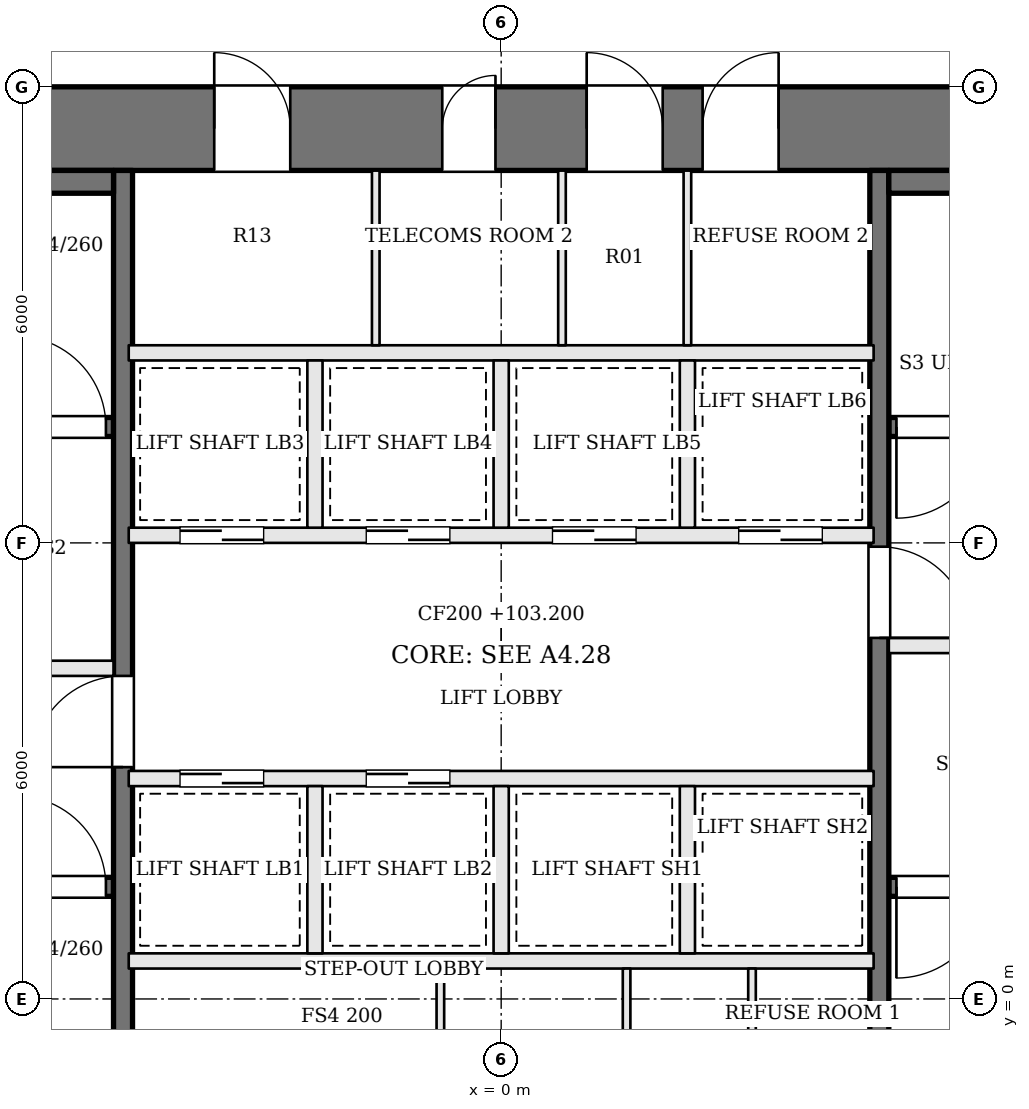
"""IFC4 building model, lengths in metres.
Left out: names, types, materials, properties, quantities, classifications, styles, units other than length and angle.
Written with IfcOpenShell. Run it as: python <this file> out.ifc"""

import sys

from ifc_helpers import new_model, si_unit, direction, frame, frame_2d, origin, place, context, subcontext, project, spatial, rectangle, extrude, element, fill, save


model = new_model("IFC4")
c1 = context("Model", 3, precision=1e-05, world=origin(), true_north=direction((0.0, 1.0)))
c2 = subcontext(c1, "Body", "Model", "MODEL_VIEW")
j1 = project(units=[si_unit("LENGTHUNIT", "METRE"), si_unit("PLANEANGLEUNIT", "RADIAN")], contexts=[c1])
p1 = place(None, origin())
s1 = spatial("IfcSite", under=j1, at=p1, CompositionType="ELEMENT")
p2 = place(p1, origin())
s2 = spatial("IfcBuilding", under=s1, at=p2, CompositionType="ELEMENT")
p3 = place(p2, frame((0.0, 0.0, 103.2)))
s3 = spatial("IfcBuildingStorey", under=s2, at=p3, CompositionType="ELEMENT", Elevation=103.2)
p4 = place(p3, frame((-13.0, 11.45, 0.0), z_axis=(0.0, 0.0, 1.0), x_axis=(1.0, 0.0, 0.0)))
e1 = element("IfcWall", 1, at=p4, inside=s3, PredefinedType="SHEAR", context=c2, shape_type="SweptSolid", body=[
    extrude(rectangle(XDim=26.0, YDim=1.1, at=frame_2d((13.0, 0.0))), origin(), (0.0, 0.0, 1.0), 3.6),
])
p5 = place(p4, frame((9.225, 0.0, 0.0)))
e2 = element("IfcOpeningElement", 2, at=p5, cuts=e1, PredefinedType="OPENING", context=c2, shape_type="SweptSolid", body=[
    extrude(rectangle(XDim=1.0, YDim=2.1, at=frame_2d((0.5, 1.05))), frame((0.0, 0.56, 0.0), z_axis=(0.0, -1.0, 0.0), x_axis=(1.0, 0.0, 0.0)), (0.0, 0.0, 1.0), 1.12),
])
p6 = place(p4, frame((12.225, 0.0, 0.0)))
e3 = element("IfcOpeningElement", 3, at=p6, cuts=e1, PredefinedType="OPENING", context=c2, shape_type="SweptSolid", body=[
    extrude(rectangle(XDim=0.7, YDim=2.1, at=frame_2d((0.35, 1.05))), frame((0.0, 0.56, 0.0), z_axis=(0.0, -1.0, 0.0), x_axis=(1.0, 0.0, 0.0)), (0.0, 0.0, 1.0), 1.12),
])
p7 = place(p4, frame((14.125, 0.0, 0.0)))
e4 = element("IfcOpeningElement", 4, at=p7, cuts=e1, PredefinedType="OPENING", context=c2, shape_type="SweptSolid", body=[
    extrude(rectangle(XDim=1.0, YDim=2.1, at=frame_2d((0.5, 1.05))), frame((0.0, 0.56, 0.0), z_axis=(0.0, -1.0, 0.0), x_axis=(1.0, 0.0, 0.0)), (0.0, 0.0, 1.0), 1.12),
])
p8 = place(p4, frame((15.65, 0.0, 0.0)))
e5 = element("IfcOpeningElement", 5, at=p8, cuts=e1, PredefinedType="OPENING", context=c2, shape_type="SweptSolid", body=[
    extrude(rectangle(XDim=1.0, YDim=2.1, at=frame_2d((0.5, 1.05))), frame((0.0, 0.56, 0.0), z_axis=(0.0, -1.0, 0.0), x_axis=(1.0, 0.0, 0.0)), (0.0, 0.0, 1.0), 1.12),
])
p9 = place(p3, frame((-11.9, 1.475, 0.0), z_axis=(0.0, 0.0, 1.0), x_axis=(1.0, 0.0, 0.0)))
e6 = element("IfcWall", 6, at=p9, inside=s3, PredefinedType="SOLIDWALL", context=c2, shape_type="SweptSolid", body=[
    extrude(rectangle(XDim=6.8, YDim=0.25, at=frame_2d((3.4, 0.0))), origin(), (0.0, 0.0, 1.0), 3.4),
])
p10 = place(p9, frame((5.5, 0.0, 0.0)))
e7 = element("IfcOpeningElement", 7, at=p10, cuts=e6, PredefinedType="OPENING", context=c2, shape_type="SweptSolid", body=[
    extrude(rectangle(XDim=1.2, YDim=2.1, at=frame_2d((0.6, 1.05))), frame((0.0, 0.135, 0.0), z_axis=(0.0, -1.0, 0.0), x_axis=(1.0, 0.0, 0.0)), (0.0, 0.0, 1.0), 0.27),
])
p11 = place(p3, frame((11.9, 7.525, 0.0), z_axis=(0.0, 0.0, 1.0), x_axis=(-1.0, 0.0, 0.0)))
e8 = element("IfcWall", 8, at=p11, inside=s3, PredefinedType="SOLIDWALL", context=c2, shape_type="SweptSolid", body=[
    extrude(rectangle(XDim=6.8, YDim=0.25, at=frame_2d((3.4, 0.0))), origin(), (0.0, 0.0, 1.0), 3.4),
])
p12 = place(p11, frame((5.5, 0.0, 0.0)))
e9 = element("IfcOpeningElement", 9, at=p12, cuts=e8, PredefinedType="OPENING", context=c2, shape_type="SweptSolid", body=[
    extrude(rectangle(XDim=1.2, YDim=2.1, at=frame_2d((0.6, 1.05))), frame((0.0, 0.135, 0.0), z_axis=(0.0, -1.0, 0.0), x_axis=(1.0, 0.0, 0.0)), (0.0, 0.0, 1.0), 0.27),
])
p13 = place(p3, frame((-11.9, 4.35, 0.0), z_axis=(0.0, 0.0, 1.0), x_axis=(1.0, 0.0, 0.0)))
e10 = element("IfcWall", 10, at=p13, inside=s3, PredefinedType="SOLIDWALL", context=c2, shape_type="SweptSolid", body=[
    extrude(rectangle(XDim=6.8, YDim=0.2, at=frame_2d((3.4, 0.0))), origin(), (0.0, 0.0, 1.0), 3.4),
])
p14 = place(p13, frame((4.1, 0.0, 0.0)))
e11 = element("IfcOpeningElement", 11, at=p14, cuts=e10, PredefinedType="OPENING", context=c2, shape_type="SweptSolid", body=[
    extrude(rectangle(XDim=1.2, YDim=2.1, at=frame_2d((0.6, 1.05))), frame((0.0, 0.11, 0.0), z_axis=(0.0, -1.0, 0.0), x_axis=(1.0, 0.0, 0.0)), (0.0, 0.0, 1.0), 0.22),
])
p15 = place(p13, frame((0.8, 0.0, 0.0)))
e12 = element("IfcOpeningElement", 12, at=p15, cuts=e10, PredefinedType="OPENING", context=c2, shape_type="SweptSolid", body=[
    extrude(rectangle(XDim=1.2, YDim=2.1, at=frame_2d((0.6, 1.05))), frame((0.0, 0.11, 0.0), z_axis=(0.0, -1.0, 0.0), x_axis=(1.0, 0.0, 0.0)), (0.0, 0.0, 1.0), 0.22),
])
p16 = place(p3, frame((11.9, 4.65, 0.0), z_axis=(0.0, 0.0, 1.0), x_axis=(-1.0, 0.0, 0.0)))
e13 = element("IfcWall", 13, at=p16, inside=s3, PredefinedType="SOLIDWALL", context=c2, shape_type="SweptSolid", body=[
    extrude(rectangle(XDim=6.8, YDim=0.2, at=frame_2d((3.4, 0.0))), origin(), (0.0, 0.0, 1.0), 3.4),
])
p17 = place(p16, frame((4.1, 0.0, 0.0)))
e14 = element("IfcOpeningElement", 14, at=p17, cuts=e13, PredefinedType="OPENING", context=c2, shape_type="SweptSolid", body=[
    extrude(rectangle(XDim=1.2, YDim=2.1, at=frame_2d((0.6, 1.05))), frame((0.0, 0.11, 0.0), z_axis=(0.0, -1.0, 0.0), x_axis=(1.0, 0.0, 0.0)), (0.0, 0.0, 1.0), 0.22),
])
p18 = place(p16, frame((0.8, 0.0, 0.0)))
e15 = element("IfcOpeningElement", 15, at=p18, cuts=e13, PredefinedType="OPENING", context=c2, shape_type="SweptSolid", body=[
    extrude(rectangle(XDim=1.2, YDim=2.1, at=frame_2d((0.6, 1.05))), frame((0.0, 0.11, 0.0), z_axis=(0.0, -1.0, 0.0), x_axis=(1.0, 0.0, 0.0)), (0.0, 0.0, 1.0), 0.22),
])
p19 = place(p3, frame((-11.9, 7.525, 0.0), z_axis=(0.0, 0.0, 1.0), x_axis=(1.0, 0.0, 0.0)))
e16 = element("IfcWall", 16, at=p19, inside=s3, PredefinedType="SOLIDWALL", context=c2, shape_type="SweptSolid", body=[
    extrude(rectangle(XDim=6.8, YDim=0.25, at=frame_2d((3.4, 0.0))), origin(), (0.0, 0.0, 1.0), 3.4),
])
p20 = place(p19, frame((5.5, 0.0, 0.0)))
e17 = element("IfcOpeningElement", 17, at=p20, cuts=e16, PredefinedType="OPENING", context=c2, shape_type="SweptSolid", body=[
    extrude(rectangle(XDim=1.2, YDim=2.1, at=frame_2d((0.6, 1.05))), frame((0.0, 0.135, 0.0), z_axis=(0.0, -1.0, 0.0), x_axis=(1.0, 0.0, 0.0)), (0.0, 0.0, 1.0), 0.27),
])
p21 = place(p3, frame((11.9, 1.475, 0.0), z_axis=(0.0, 0.0, 1.0), x_axis=(-1.0, 0.0, 0.0)))
e18 = element("IfcWall", 18, at=p21, inside=s3, PredefinedType="SOLIDWALL", context=c2, shape_type="SweptSolid", body=[
    extrude(rectangle(XDim=6.8, YDim=0.25, at=frame_2d((3.4, 0.0))), origin(), (0.0, 0.0, 1.0), 3.4),
])
p22 = place(p21, frame((5.5, 0.0, 0.0)))
e19 = element("IfcOpeningElement", 19, at=p22, cuts=e18, PredefinedType="OPENING", context=c2, shape_type="SweptSolid", body=[
    extrude(rectangle(XDim=1.2, YDim=2.1, at=frame_2d((0.6, 1.05))), frame((0.0, 0.135, 0.0), z_axis=(0.0, -1.0, 0.0), x_axis=(1.0, 0.0, 0.0)), (0.0, 0.0, 1.0), 0.27),
])
p23 = place(p3, frame((-4.975, -1.9, 0.0), z_axis=(0.0, 0.0, 1.0), x_axis=(0.0, 1.0, 0.0)))
e20 = element("IfcWall", 20, at=p23, inside=s3, PredefinedType="SOLIDWALL", context=c2, shape_type="SweptSolid", body=[
    extrude(rectangle(XDim=12.8, YDim=0.25, at=frame_2d((6.4, 0.0))), origin(), (0.0, 0.0, 1.0), 3.4),
])
p24 = place(p23, frame((4.95, 0.0, 0.0)))
e21 = element("IfcOpeningElement", 21, at=p24, cuts=e20, PredefinedType="OPENING", context=c2, shape_type="SweptSolid", body=[
    extrude(rectangle(XDim=1.2, YDim=2.1, at=frame_2d((0.6, 1.05))), frame((0.0, 0.135, 0.0), z_axis=(0.0, -1.0, 0.0), x_axis=(1.0, 0.0, 0.0)), (0.0, 0.0, 1.0), 0.27),
])
p25 = place(p3, frame((4.975, 10.9, 0.0), z_axis=(0.0, 0.0, 1.0), x_axis=(0.0, -1.0, 0.0)))
e22 = element("IfcWall", 22, at=p25, inside=s3, PredefinedType="SOLIDWALL", context=c2, shape_type="SweptSolid", body=[
    extrude(rectangle(XDim=12.8, YDim=0.25, at=frame_2d((6.4, 0.0))), origin(), (0.0, 0.0, 1.0), 3.4),
])
p26 = place(p25, frame((4.95, 0.0, 0.0)))
e23 = element("IfcOpeningElement", 23, at=p26, cuts=e22, PredefinedType="OPENING", context=c2, shape_type="SweptSolid", body=[
    extrude(rectangle(XDim=1.2, YDim=2.1, at=frame_2d((0.6, 1.05))), frame((0.0, 0.135, 0.0), z_axis=(0.0, -1.0, 0.0), x_axis=(1.0, 0.0, 0.0)), (0.0, 0.0, 1.0), 0.27),
])
for number, where, z_axis, x_axis in (
    (24, (-11.9, 10.75, 0.0), (0.0, 0.0, 1.0), (1.0, 0.0, 0.0)),
    (25, (11.9, 10.75, 0.0), (0.0, 0.0, 1.0), (-1.0, 0.0, 0.0)),
):
    element("IfcWall", number, at=place(p3, frame(where, z_axis=z_axis, x_axis=x_axis)), inside=s3, PredefinedType="SOLIDWALL", context=c2, shape_type="SweptSolid", body=[
        extrude(rectangle(XDim=6.8, YDim=0.3, at=frame_2d((3.4, 0.0))), origin(), (0.0, 0.0, 1.0), 3.4),
    ])
p27 = place(p3, frame((-4.9, 0.5, 0.0), z_axis=(0.0, 0.0, 1.0), x_axis=(1.0, 0.0, 0.0)))
e26 = element("IfcWall", 26, at=p27, inside=s3, PredefinedType="SOLIDWALL", context=c2, shape_type="SweptSolid", body=[
    extrude(rectangle(XDim=9.8, YDim=0.2, at=frame_2d((4.9, 0.0))), origin(), (0.0, 0.0, 1.0), 3.4),
])
p28 = place(p3, frame((-4.9, 2.9, 0.0), z_axis=(0.0, 0.0, 1.0), x_axis=(1.0, 0.0, 0.0)))
e27 = element("IfcWall", 27, at=p28, inside=s3, PredefinedType="SOLIDWALL", context=c2, shape_type="SweptSolid", body=[
    extrude(rectangle(XDim=9.8, YDim=0.2, at=frame_2d((4.9, 0.0))), origin(), (0.0, 0.0, 1.0), 3.4),
])
p29 = place(p28, frame((0.675, 0.0, 0.0)))
e28 = element("IfcOpeningElement", 28, at=p29, cuts=e27, PredefinedType="OPENING", context=c2, shape_type="SweptSolid", body=[
    extrude(rectangle(XDim=1.1, YDim=2.1, at=frame_2d((0.55, 1.05))), frame((0.0, 0.11, 0.0), z_axis=(0.0, -1.0, 0.0), x_axis=(1.0, 0.0, 0.0)), (0.0, 0.0, 1.0), 0.22),
])
p30 = place(p28, frame((3.125, 0.0, 0.0)))
e29 = element("IfcOpeningElement", 29, at=p30, cuts=e27, PredefinedType="OPENING", context=c2, shape_type="SweptSolid", body=[
    extrude(rectangle(XDim=1.1, YDim=2.1, at=frame_2d((0.55, 1.05))), frame((0.0, 0.11, 0.0), z_axis=(0.0, -1.0, 0.0), x_axis=(1.0, 0.0, 0.0)), (0.0, 0.0, 1.0), 0.22),
])
p31 = place(p3, frame((-4.9, 6.1, 0.0), z_axis=(0.0, 0.0, 1.0), x_axis=(1.0, 0.0, 0.0)))
e30 = element("IfcWall", 30, at=p31, inside=s3, PredefinedType="SOLIDWALL", context=c2, shape_type="SweptSolid", body=[
    extrude(rectangle(XDim=9.8, YDim=0.2, at=frame_2d((4.9, 0.0))), origin(), (0.0, 0.0, 1.0), 3.4),
])
p32 = place(p31, frame((0.675, 0.0, 0.0)))
e31 = element("IfcOpeningElement", 31, at=p32, cuts=e30, PredefinedType="OPENING", context=c2, shape_type="SweptSolid", body=[
    extrude(rectangle(XDim=1.1, YDim=2.1, at=frame_2d((0.55, 1.05))), frame((0.0, 0.11, 0.0), z_axis=(0.0, -1.0, 0.0), x_axis=(1.0, 0.0, 0.0)), (0.0, 0.0, 1.0), 0.22),
])
p33 = place(p31, frame((3.125, 0.0, 0.0)))
e32 = element("IfcOpeningElement", 32, at=p33, cuts=e30, PredefinedType="OPENING", context=c2, shape_type="SweptSolid", body=[
    extrude(rectangle(XDim=1.1, YDim=2.1, at=frame_2d((0.55, 1.05))), frame((0.0, 0.11, 0.0), z_axis=(0.0, -1.0, 0.0), x_axis=(1.0, 0.0, 0.0)), (0.0, 0.0, 1.0), 0.22),
])
p34 = place(p31, frame((5.575, 0.0, 0.0)))
e33 = element("IfcOpeningElement", 33, at=p34, cuts=e30, PredefinedType="OPENING", context=c2, shape_type="SweptSolid", body=[
    extrude(rectangle(XDim=1.1, YDim=2.1, at=frame_2d((0.55, 1.05))), frame((0.0, 0.11, 0.0), z_axis=(0.0, -1.0, 0.0), x_axis=(1.0, 0.0, 0.0)), (0.0, 0.0, 1.0), 0.22),
])
p35 = place(p31, frame((8.025, 0.0, 0.0)))
e34 = element("IfcOpeningElement", 34, at=p35, cuts=e30, PredefinedType="OPENING", context=c2, shape_type="SweptSolid", body=[
    extrude(rectangle(XDim=1.1, YDim=2.1, at=frame_2d((0.55, 1.05))), frame((0.0, 0.11, 0.0), z_axis=(0.0, -1.0, 0.0), x_axis=(1.0, 0.0, 0.0)), (0.0, 0.0, 1.0), 0.22),
])
p36 = place(p3, frame((-4.9, 8.5, 0.0), z_axis=(0.0, 0.0, 1.0), x_axis=(1.0, 0.0, 0.0)))
e35 = element("IfcWall", 35, at=p36, inside=s3, PredefinedType="SOLIDWALL", context=c2, shape_type="SweptSolid", body=[
    extrude(rectangle(XDim=9.8, YDim=0.2, at=frame_2d((4.9, 0.0))), origin(), (0.0, 0.0, 1.0), 3.4),
])
for number, where, z_axis, x_axis in (
    (36, (-2.45, 0.6, 0.0), (0.0, 0.0, 1.0), (0.0, 1.0, 0.0)),
    (37, (0.0, 0.6, 0.0), (0.0, 0.0, 1.0), (0.0, 1.0, 0.0)),
    (38, (2.45, 0.6, 0.0), (0.0, 0.0, 1.0), (0.0, 1.0, 0.0)),
    (39, (-2.45, 6.2, 0.0), (0.0, 0.0, 1.0), (0.0, 1.0, 0.0)),
    (40, (0.0, 6.2, 0.0), (0.0, 0.0, 1.0), (0.0, 1.0, 0.0)),
    (41, (2.45, 6.2, 0.0), (0.0, 0.0, 1.0), (0.0, 1.0, 0.0)),
):
    element("IfcWall", number, at=place(p3, frame(where, z_axis=z_axis, x_axis=x_axis)), inside=s3, PredefinedType="SOLIDWALL", context=c2, shape_type="SweptSolid", body=[
        extrude(rectangle(XDim=2.2, YDim=0.2, at=frame_2d((1.1, 0.0))), origin(), (0.0, 0.0, 1.0), 3.4),
    ])
for number, where, z_axis, x_axis in (
    (42, (-0.8, -1.9, 0.0), (0.0, 0.0, 1.0), (0.0, 1.0, 0.0)),
    (43, (1.65, -1.9, 0.0), (0.0, 0.0, 1.0), (0.0, 1.0, 0.0)),
    (44, (3.3, -1.9, 0.0), (0.0, 0.0, 1.0), (0.0, 1.0, 0.0)),
    (45, (-1.65, 8.6, 0.0), (0.0, 0.0, 1.0), (0.0, 1.0, 0.0)),
    (46, (0.8, 8.6, 0.0), (0.0, 0.0, 1.0), (0.0, 1.0, 0.0)),
    (47, (2.45, 8.6, 0.0), (0.0, 0.0, 1.0), (0.0, 1.0, 0.0)),
):
    element("IfcWall", number, at=place(p3, frame(where, z_axis=z_axis, x_axis=x_axis)), inside=s3, PredefinedType="PARTITIONING", context=c2, shape_type="SweptSolid", body=[
        extrude(rectangle(XDim=2.3, YDim=0.1, at=frame_2d((1.15, 0.0))), origin(), (0.0, 0.0, 1.0), 3.4),
    ])
p37 = place(p24, origin())
e48 = element("IfcDoor", 48, at=p37, inside=s3, OperationType="SINGLE_SWING_LEFT", PredefinedType="DOOR", context=c2, shape_type="SweptSolid", body=[
    extrude(rectangle(XDim=1.2, YDim=2.1, at=frame_2d((0.6, 1.05))), frame((0.0, 0.025, 0.0), z_axis=(0.0, -1.0, 0.0), x_axis=(1.0, 0.0, 0.0)), (0.0, 0.0, 1.0), 0.05),
])
fill(e21, e48)
p38 = place(p26, origin())
e49 = element("IfcDoor", 49, at=p38, inside=s3, OperationType="SINGLE_SWING_RIGHT", PredefinedType="DOOR", context=c2, shape_type="SweptSolid", body=[
    extrude(rectangle(XDim=1.2, YDim=2.1, at=frame_2d((0.6, 1.05))), frame((0.0, 0.025, 0.0), z_axis=(0.0, -1.0, 0.0), x_axis=(1.0, 0.0, 0.0)), (0.0, 0.0, 1.0), 0.05),
])
fill(e23, e49)
p39 = place(p10, origin())
e50 = element("IfcDoor", 50, at=p39, inside=s3, OperationType="SINGLE_SWING_LEFT", PredefinedType="DOOR", context=c2, shape_type="SweptSolid", body=[
    extrude(rectangle(XDim=1.2, YDim=2.1, at=frame_2d((0.6, 1.05))), frame((0.0, 0.025, 0.0), z_axis=(0.0, -1.0, 0.0), x_axis=(1.0, 0.0, 0.0)), (0.0, 0.0, 1.0), 0.05),
])
fill(e7, e50)
p40 = place(p12, origin())
e51 = element("IfcDoor", 51, at=p40, inside=s3, OperationType="SINGLE_SWING_RIGHT", PredefinedType="DOOR", context=c2, shape_type="SweptSolid", body=[
    extrude(rectangle(XDim=1.2, YDim=2.1, at=frame_2d((0.6, 1.05))), frame((0.0, 0.025, 0.0), z_axis=(0.0, -1.0, 0.0), x_axis=(1.0, 0.0, 0.0)), (0.0, 0.0, 1.0), 0.05),
])
fill(e9, e51)
p41 = place(p20, origin())
e52 = element("IfcDoor", 52, at=p41, inside=s3, OperationType="SINGLE_SWING_LEFT", PredefinedType="DOOR", context=c2, shape_type="SweptSolid", body=[
    extrude(rectangle(XDim=1.2, YDim=2.1, at=frame_2d((0.6, 1.05))), frame((0.0, 0.025, 0.0), z_axis=(0.0, -1.0, 0.0), x_axis=(1.0, 0.0, 0.0)), (0.0, 0.0, 1.0), 0.05),
])
fill(e17, e52)
p42 = place(p22, origin())
e53 = element("IfcDoor", 53, at=p42, inside=s3, OperationType="SINGLE_SWING_RIGHT", PredefinedType="DOOR", context=c2, shape_type="SweptSolid", body=[
    extrude(rectangle(XDim=1.2, YDim=2.1, at=frame_2d((0.6, 1.05))), frame((0.0, 0.025, 0.0), z_axis=(0.0, -1.0, 0.0), x_axis=(1.0, 0.0, 0.0)), (0.0, 0.0, 1.0), 0.05),
])
fill(e19, e53)
p43 = place(p29, origin())
e54 = element("IfcDoor", 54, at=p43, inside=s3, OperationType="SLIDING_TO_RIGHT", PredefinedType="DOOR", context=c2, shape_type="SweptSolid", body=[
    extrude(rectangle(XDim=1.1, YDim=2.1, at=frame_2d((0.55, 1.05))), frame((0.0, 0.025, 0.0), z_axis=(0.0, -1.0, 0.0), x_axis=(1.0, 0.0, 0.0)), (0.0, 0.0, 1.0), 0.05),
])
fill(e28, e54)
p44 = place(p30, origin())
e55 = element("IfcDoor", 55, at=p44, inside=s3, OperationType="SLIDING_TO_LEFT", PredefinedType="DOOR", context=c2, shape_type="SweptSolid", body=[
    extrude(rectangle(XDim=1.1, YDim=2.1, at=frame_2d((0.55, 1.05))), frame((0.0, 0.025, 0.0), z_axis=(0.0, -1.0, 0.0), x_axis=(1.0, 0.0, 0.0)), (0.0, 0.0, 1.0), 0.05),
])
fill(e29, e55)
p45 = place(p32, origin())
e56 = element("IfcDoor", 56, at=p45, inside=s3, OperationType="SLIDING_TO_RIGHT", PredefinedType="DOOR", context=c2, shape_type="SweptSolid", body=[
    extrude(rectangle(XDim=1.1, YDim=2.1, at=frame_2d((0.55, 1.05))), frame((0.0, 0.025, 0.0), z_axis=(0.0, -1.0, 0.0), x_axis=(1.0, 0.0, 0.0)), (0.0, 0.0, 1.0), 0.05),
])
fill(e31, e56)
p46 = place(p33, origin())
e57 = element("IfcDoor", 57, at=p46, inside=s3, OperationType="SLIDING_TO_LEFT", PredefinedType="DOOR", context=c2, shape_type="SweptSolid", body=[
    extrude(rectangle(XDim=1.1, YDim=2.1, at=frame_2d((0.55, 1.05))), frame((0.0, 0.025, 0.0), z_axis=(0.0, -1.0, 0.0), x_axis=(1.0, 0.0, 0.0)), (0.0, 0.0, 1.0), 0.05),
])
fill(e32, e57)
p47 = place(p34, origin())
e58 = element("IfcDoor", 58, at=p47, inside=s3, OperationType="SLIDING_TO_RIGHT", PredefinedType="DOOR", context=c2, shape_type="SweptSolid", body=[
    extrude(rectangle(XDim=1.1, YDim=2.1, at=frame_2d((0.55, 1.05))), frame((0.0, 0.025, 0.0), z_axis=(0.0, -1.0, 0.0), x_axis=(1.0, 0.0, 0.0)), (0.0, 0.0, 1.0), 0.05),
])
fill(e33, e58)
p48 = place(p35, origin())
e59 = element("IfcDoor", 59, at=p48, inside=s3, OperationType="SLIDING_TO_LEFT", PredefinedType="DOOR", context=c2, shape_type="SweptSolid", body=[
    extrude(rectangle(XDim=1.1, YDim=2.1, at=frame_2d((0.55, 1.05))), frame((0.0, 0.025, 0.0), z_axis=(0.0, -1.0, 0.0), x_axis=(1.0, 0.0, 0.0)), (0.0, 0.0, 1.0), 0.05),
])
fill(e34, e59)
p49 = place(p5, origin())
e60 = element("IfcDoor", 60, at=p49, inside=s3, OperationType="SINGLE_SWING_LEFT", PredefinedType="DOOR", context=c2, shape_type="SweptSolid", body=[
    extrude(rectangle(XDim=1.0, YDim=2.1, at=frame_2d((0.5, 1.05))), frame((0.0, 0.025, 0.0), z_axis=(0.0, -1.0, 0.0), x_axis=(1.0, 0.0, 0.0)), (0.0, 0.0, 1.0), 0.05),
])
fill(e2, e60)
p50 = place(p6, origin())
e61 = element("IfcDoor", 61, at=p50, inside=s3, OperationType="SINGLE_SWING_RIGHT", PredefinedType="DOOR", context=c2, shape_type="SweptSolid", body=[
    extrude(rectangle(XDim=0.7, YDim=2.1, at=frame_2d((0.35, 1.05))), frame((0.0, 0.025, 0.0), z_axis=(0.0, -1.0, 0.0), x_axis=(1.0, 0.0, 0.0)), (0.0, 0.0, 1.0), 0.05),
])
fill(e3, e61)
p51 = place(p7, origin())
e62 = element("IfcDoor", 62, at=p51, inside=s3, OperationType="SINGLE_SWING_LEFT", PredefinedType="DOOR", context=c2, shape_type="SweptSolid", body=[
    extrude(rectangle(XDim=1.0, YDim=2.1, at=frame_2d((0.5, 1.05))), frame((0.0, 0.025, 0.0), z_axis=(0.0, -1.0, 0.0), x_axis=(1.0, 0.0, 0.0)), (0.0, 0.0, 1.0), 0.05),
])
fill(e4, e62)
p52 = place(p8, origin())
e63 = element("IfcDoor", 63, at=p52, inside=s3, OperationType="SINGLE_SWING_RIGHT", PredefinedType="DOOR", context=c2, shape_type="SweptSolid", body=[
    extrude(rectangle(XDim=1.0, YDim=2.1, at=frame_2d((0.5, 1.05))), frame((0.0, 0.025, 0.0), z_axis=(0.0, -1.0, 0.0), x_axis=(1.0, 0.0, 0.0)), (0.0, 0.0, 1.0), 0.05),
])
fill(e5, e63)
save(model, sys.argv[1])
